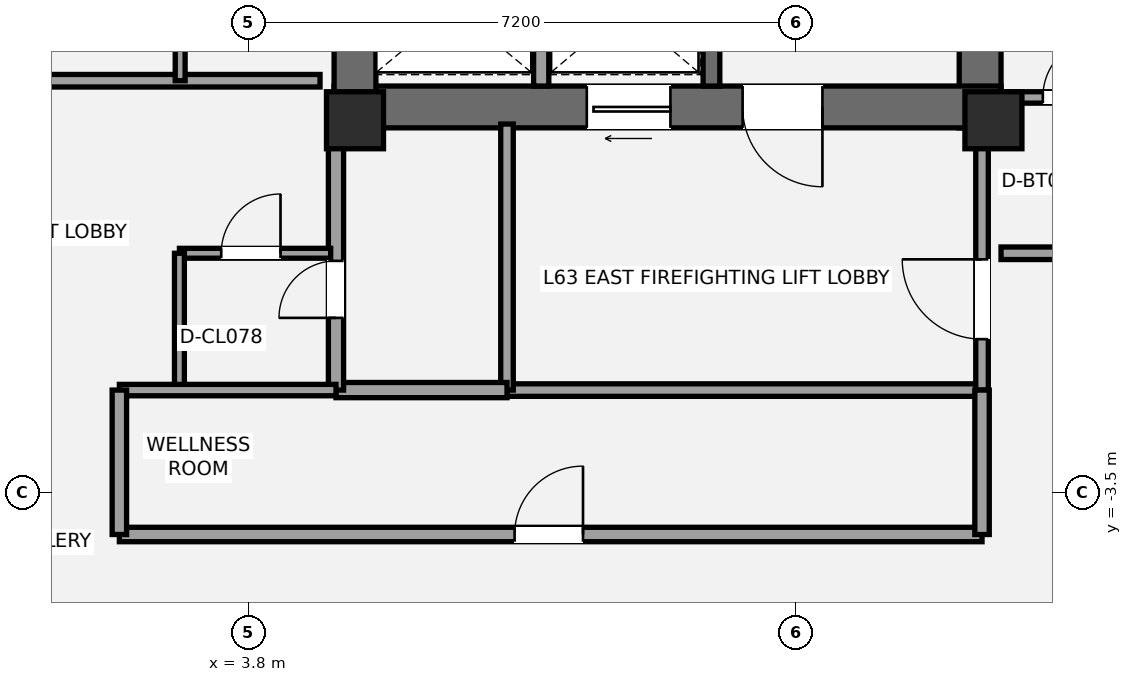
"""IFC4 building model, lengths in metres.
Left out: names, types, materials, properties, quantities, classifications, styles, units other than length and angle.
Written with IfcOpenShell. Run it as: python <this file> out.ifc"""

import sys

from ifc_helpers import new_model, si_unit, direction, frame, frame_2d, origin, origin_2d, place, context, subcontext, project, spatial, rectangle, extrude, element, fill, save


model = new_model("IFC4")
c1 = context("Model", 3, precision=1e-05, world=origin(), true_north=direction((0.0, 1.0)))
c2 = subcontext(c1, "Body", "Model", "MODEL_VIEW")
j1 = project(units=[si_unit("LENGTHUNIT", "METRE"), si_unit("PLANEANGLEUNIT", "RADIAN")], contexts=[c1])
p1 = place(None, origin())
s1 = spatial("IfcSite", under=j1, at=p1, CompositionType="ELEMENT")
p2 = place(p1, origin())
s2 = spatial("IfcBuilding", under=s1, at=p2, CompositionType="ELEMENT")
p3 = place(p2, frame((0.0, 0.0, 225.75)))
s3 = spatial("IfcBuildingStorey", under=s2, at=p3, CompositionType="ELEMENT", Elevation=225.75)
p4 = place(p3, frame((13.425, 1.3, 0.0), z_axis=(0.0, 0.0, 1.0), x_axis=(0.0, 1.0, 0.0)))
e1 = element("IfcWall", 1, at=p4, inside=s3, PredefinedType="SHEAR", context=c2, shape_type="SweptSolid", body=[
    extrude(rectangle(XDim=8.25, YDim=0.55, at=frame_2d((4.125, 0.0))), origin(), (0.0, 0.0, 1.0), 3.15),
])
p5 = place(p3, frame((13.7, 1.575, 0.0), z_axis=(0.0, 0.0, 1.0), x_axis=(-1.0, 0.0, 0.0)))
e2 = element("IfcWall", 2, at=p5, inside=s3, PredefinedType="SHEAR", context=c2, shape_type="SweptSolid", body=[
    extrude(rectangle(XDim=8.775, YDim=0.55, at=frame_2d((4.387, 0.0))), origin(), (0.0, 0.0, 1.0), 3.15),
])
p6 = place(p5, frame((2.35, 0.0, 0.0)))
e3 = element("IfcOpeningElement", 3, at=p6, cuts=e2, PredefinedType="OPENING", context=c2, shape_type="SweptSolid", body=[
    extrude(rectangle(XDim=1.05, YDim=2.15, at=frame_2d((0.525, 1.075))), frame((0.0, 0.285, 0.0), z_axis=(0.0, -1.0, 0.0), x_axis=(1.0, 0.0, 0.0)), (0.0, 0.0, 1.0), 0.57),
])
p7 = place(p5, frame((4.35, 0.0, 0.0)))
e4 = element("IfcOpeningElement", 4, at=p7, cuts=e2, PredefinedType="OPENING", context=c2, shape_type="SweptSolid", body=[
    extrude(rectangle(XDim=1.1, YDim=2.2, at=frame_2d((0.55, 1.1))), frame((0.0, 0.285, 0.0), z_axis=(0.0, -1.0, 0.0), x_axis=(1.0, 0.0, 0.0)), (0.0, 0.0, 1.0), 0.57),
])
p8 = place(p3, frame((5.2, 1.3, 0.0), z_axis=(0.0, 0.0, 1.0), x_axis=(0.0, 1.0, 0.0)))
e5 = element("IfcWall", 5, at=p8, inside=s3, PredefinedType="SHEAR", context=c2, shape_type="SweptSolid", body=[
    extrude(rectangle(XDim=2.5, YDim=0.55, at=frame_2d((1.25, 0.0))), origin(), (0.0, 0.0, 1.0), 3.15),
])
p9 = place(p3, frame((9.89, 1.85, 0.0), z_axis=(0.0, 0.0, 1.0), x_axis=(0.0, 1.0, 0.0)))
e6 = element("IfcWall", 6, at=p9, inside=s3, PredefinedType="SHEAR", context=c2, shape_type="SweptSolid", body=[
    extrude(rectangle(XDim=7.15, YDim=0.22, at=frame_2d((3.575, 0.0))), origin(), (0.0, 0.0, 1.0), 3.15),
])
for number, where, z_axis, x_axis in (
    (7, (5.2, 1.4, 0.0), (0.0, 0.0, 1.0), (1.0, 0.0, 0.0)),
    (8, (13.6, 1.4, 0.0), (0.0, 0.0, 1.0), (1.0, 0.0, 0.0)),
):
    element("IfcColumn", number, at=place(p3, frame(where, z_axis=z_axis, x_axis=x_axis)), inside=s3, PredefinedType="PILASTER", context=c2, shape_type="SweptSolid", body=[
        extrude(rectangle(XDim=0.75, YDim=0.75, at=origin_2d()), origin(), (0.0, 0.0, 1.0), 3.15),
    ])
p10 = place(p3, frame((7.2, -2.15, 0.0), z_axis=(0.0, 0.0, 1.0), x_axis=(1.0, 0.0, 0.0)))
e9 = element("IfcWall", 9, at=p10, inside=s3, PredefinedType="PARTITIONING", context=c2, shape_type="SweptSolid", body=[
    extrude(rectangle(XDim=6.25, YDim=0.165, at=frame_2d((3.125, 0.0))), origin(), (0.0, 0.0, 1.0), 2.97),
])
p11 = place(p3, frame((7.2, -2.15, 0.0), z_axis=(0.0, 0.0, 1.0), x_axis=(0.0, 1.0, 0.0)))
e10 = element("IfcWall", 10, at=p11, inside=s3, PredefinedType="PARTITIONING", context=c2, shape_type="SweptSolid", body=[
    extrude(rectangle(XDim=3.5, YDim=0.165, at=frame_2d((1.75, 0.0))), origin(), (0.0, 0.0, 1.0), 2.423),
])
p12 = place(p3, frame((13.45, -2.15, 0.0), z_axis=(0.0, 0.0, 1.0), x_axis=(0.0, 1.0, 0.0)))
e11 = element("IfcWall", 11, at=p12, inside=s3, PredefinedType="PARTITIONING", context=c2, shape_type="SweptSolid", body=[
    extrude(rectangle(XDim=3.5, YDim=0.165, at=frame_2d((1.75, 0.0))), origin(), (0.0, 0.0, 1.0), 2.423),
])
p13 = place(p12, frame((0.67, 0.0, 0.0)))
e12 = element("IfcOpeningElement", 12, at=p13, cuts=e11, PredefinedType="OPENING", context=c2, shape_type="SweptSolid", body=[
    extrude(rectangle(XDim=1.05, YDim=2.15, at=frame_2d((0.525, 1.075))), frame((0.0, 0.093, 0.0), z_axis=(0.0, -1.0, 0.0), x_axis=(1.0, 0.0, 0.0)), (0.0, 0.0, 1.0), 0.185),
])
p14 = place(p3, frame((4.95, -2.15, 0.0), z_axis=(0.0, 0.0, 1.0), x_axis=(1.0, 0.0, 0.0)))
e13 = element("IfcWall", 13, at=p14, inside=s3, PredefinedType="SOLIDWALL", context=c2, shape_type="SweptSolid", body=[
    extrude(rectangle(XDim=2.25, YDim=0.2, at=frame_2d((1.125, 0.0))), origin(), (0.0, 0.0, 1.0), 2.97),
])
p15 = place(p3, frame((4.95, -2.15, 0.0), z_axis=(0.0, 0.0, 1.0), x_axis=(0.0, 1.0, 0.0)))
e14 = element("IfcWall", 14, at=p15, inside=s3, PredefinedType="SOLIDWALL", context=c2, shape_type="SweptSolid", body=[
    extrude(rectangle(XDim=3.5, YDim=0.2, at=frame_2d((1.75, 0.0))), origin(), (0.0, 0.0, 1.0), 2.423),
])
p16 = place(p15, frame((0.95, 0.0, 0.0)))
e15 = element("IfcOpeningElement", 15, at=p16, cuts=e14, PredefinedType="OPENING", context=c2, shape_type="SweptSolid", body=[
    extrude(rectangle(XDim=0.75, YDim=2.1, at=frame_2d((0.375, 1.05))), frame((0.0, 0.11, 0.0), z_axis=(0.0, -1.0, 0.0), x_axis=(1.0, 0.0, 0.0)), (0.0, 0.0, 1.0), 0.22),
])
p17 = place(p3, frame((2.89, -0.35, 0.0), z_axis=(0.0, 0.0, 1.0), x_axis=(1.0, 0.0, 0.0)))
e16 = element("IfcWall", 16, at=p17, inside=s3, PredefinedType="PARTITIONING", context=c2, shape_type="SweptSolid", body=[
    extrude(rectangle(XDim=1.99, YDim=0.13, at=frame_2d((0.995, 0.0))), origin(), (0.0, 0.0, 1.0), 2.423),
])
p18 = place(p17, frame((0.55, 0.0, 0.0)))
e17 = element("IfcOpeningElement", 17, at=p18, cuts=e16, PredefinedType="OPENING", context=c2, shape_type="SweptSolid", body=[
    extrude(rectangle(XDim=0.78, YDim=2.1, at=frame_2d((0.39, 1.05))), frame((0.0, 0.075, 0.0), z_axis=(0.0, -1.0, 0.0), x_axis=(1.0, 0.0, 0.0)), (0.0, 0.0, 1.0), 0.15),
])
p19 = place(p3, frame((2.89, -2.15, 0.0), z_axis=(0.0, 0.0, 1.0), x_axis=(0.0, 1.0, 0.0)))
e18 = element("IfcWall", 18, at=p19, inside=s3, PredefinedType="PARTITIONING", context=c2, shape_type="SweptSolid", body=[
    extrude(rectangle(XDim=1.8, YDim=0.13, at=frame_2d((0.9, 0.0))), origin(), (0.0, 0.0, 1.0), 2.97),
])
p20 = place(p3, frame((7.65, 1.85, 0.0), z_axis=(0.0, 0.0, 1.0), x_axis=(0.0, 1.0, 0.0)))
e19 = element("IfcWall", 19, at=p20, inside=s3, PredefinedType="SOLIDWALL", context=c2, shape_type="SweptSolid", body=[
    extrude(rectangle(XDim=1.97, YDim=0.2, at=frame_2d((0.985, 0.0))), origin(), (0.0, 0.0, 1.0), 2.97),
])
p21 = place(p3, frame((0.85, 1.92, 0.0), z_axis=(0.0, 0.0, 1.0), x_axis=(1.0, 0.0, 0.0)))
e20 = element("IfcWall", 20, at=p21, inside=s3, PredefinedType="PARTITIONING", context=c2, shape_type="SweptSolid", body=[
    extrude(rectangle(XDim=3.89, YDim=0.165, at=frame_2d((1.945, 0.0))), origin(), (0.0, 0.0, 1.0), 2.11),
])
p22 = place(p3, frame((2.9, 1.92, 0.0), z_axis=(0.0, 0.0, 1.0), x_axis=(0.0, 1.0, 0.0)))
e21 = element("IfcWall", 21, at=p22, inside=s3, PredefinedType="PARTITIONING", context=c2, shape_type="SweptSolid", body=[
    extrude(rectangle(XDim=1.82, YDim=0.13, at=frame_2d((0.91, 0.0))), origin(), (0.0, 0.0, 1.0), 2.97),
])
p23 = place(p3, frame((2.1, -4.05, 0.0), z_axis=(0.0, 0.0, 1.0), x_axis=(1.0, 0.0, 0.0)))
e22 = element("IfcWall", 22, at=p23, inside=s3, PredefinedType="PLUMBINGWALL", context=c2, shape_type="SweptSolid", body=[
    extrude(rectangle(XDim=11.35, YDim=0.19, at=frame_2d((5.675, 0.0))), origin(), (0.0, 0.0, 1.0), 2.357),
])
p24 = place(p23, frame((5.2, 0.0, 0.0)))
e23 = element("IfcOpeningElement", 23, at=p24, cuts=e22, PredefinedType="OPENING", context=c2, shape_type="SweptSolid", body=[
    extrude(rectangle(XDim=0.9, YDim=2.1, at=frame_2d((0.45, 1.05))), frame((0.0, 0.105, 0.0), z_axis=(0.0, -1.0, 0.0), x_axis=(1.0, 0.0, 0.0)), (0.0, 0.0, 1.0), 0.21),
])
p25 = place(p3, frame((2.1, -2.15, 0.0), z_axis=(0.0, 0.0, 1.0), x_axis=(1.0, 0.0, 0.0)))
e24 = element("IfcWall", 24, at=p25, inside=s3, PredefinedType="PLUMBINGWALL", context=c2, shape_type="SweptSolid", body=[
    extrude(rectangle(XDim=2.85, YDim=0.15, at=frame_2d((1.425, 0.0))), origin(), (0.0, 0.0, 1.0), 2.97),
])
p26 = place(p3, frame((2.1, -4.05, 0.0), z_axis=(0.0, 0.0, 1.0), x_axis=(0.0, 1.0, 0.0)))
e25 = element("IfcWall", 25, at=p26, inside=s3, PredefinedType="PLUMBINGWALL", context=c2, shape_type="SweptSolid", body=[
    extrude(rectangle(XDim=1.9, YDim=0.19, at=frame_2d((0.95, 0.0))), origin(), (0.0, 0.0, 1.0), 2.97),
])
p27 = place(p3, frame((13.45, -4.05, 0.0), z_axis=(0.0, 0.0, 1.0), x_axis=(0.0, 1.0, 0.0)))
e26 = element("IfcWall", 26, at=p27, inside=s3, PredefinedType="PLUMBINGWALL", context=c2, shape_type="SweptSolid", body=[
    extrude(rectangle(XDim=1.9, YDim=0.19, at=frame_2d((0.95, 0.0))), origin(), (0.0, 0.0, 1.0), 2.423),
])
p28 = place(p3, frame((13.7, -0.35, 0.0), z_axis=(0.0, 0.0, 1.0), x_axis=(1.0, 0.0, 0.0)))
e27 = element("IfcWall", 27, at=p28, inside=s3, PredefinedType="PARTITIONING", context=c2, shape_type="SweptSolid", body=[
    extrude(rectangle(XDim=1.85, YDim=0.165, at=frame_2d((0.925, 0.0))), origin(), (0.0, 0.0, 1.0), 2.423),
])
p29 = place(p3, frame((13.7, 1.7, 0.0), z_axis=(0.0, 0.0, 1.0), x_axis=(1.0, 0.0, 0.0)))
e28 = element("IfcWall", 28, at=p29, inside=s3, PredefinedType="PLUMBINGWALL", context=c2, shape_type="SweptSolid", body=[
    extrude(rectangle(XDim=4.25, YDim=0.15, at=frame_2d((2.125, 0.0))), origin(), (0.0, 0.0, 1.0), 2.423),
])
p30 = place(p29, frame((0.55, 0.0, 0.0)))
e29 = element("IfcOpeningElement", 29, at=p30, cuts=e28, PredefinedType="OPENING", context=c2, shape_type="SweptSolid", body=[
    extrude(rectangle(XDim=0.8, YDim=2.1, at=frame_2d((0.4, 1.05))), frame((0.0, 0.085, 0.0), z_axis=(0.0, -1.0, 0.0), x_axis=(1.0, 0.0, 0.0)), (0.0, 0.0, 1.0), 0.17),
])
p31 = place(p29, frame((2.15, 0.0, 0.0)))
e30 = element("IfcOpeningElement", 30, at=p31, cuts=e28, PredefinedType="OPENING", context=c2, shape_type="SweptSolid", body=[
    extrude(rectangle(XDim=0.85, YDim=2.1, at=frame_2d((0.425, 1.05))), frame((0.0, 0.085, 0.0), z_axis=(0.0, -1.0, 0.0), x_axis=(1.0, 0.0, 0.0)), (0.0, 0.0, 1.0), 0.17),
])
p32 = place(p6, origin())
e31 = element("IfcDoor", 31, at=p32, inside=s3, OperationType="SINGLE_SWING_LEFT", PredefinedType="DOOR", context=c2, shape_type="SweptSolid", body=[
    extrude(rectangle(XDim=1.05, YDim=2.15, at=frame_2d((0.525, 1.075))), frame((0.0, 0.025, 0.0), z_axis=(0.0, -1.0, 0.0), x_axis=(1.0, 0.0, 0.0)), (0.0, 0.0, 1.0), 0.05),
])
fill(e3, e31)
p33 = place(p13, origin())
e32 = element("IfcDoor", 32, at=p33, inside=s3, OperationType="SINGLE_SWING_RIGHT", PredefinedType="DOOR", context=c2, shape_type="SweptSolid", body=[
    extrude(rectangle(XDim=1.05, YDim=2.15, at=frame_2d((0.525, 1.075))), frame((0.0, 0.025, 0.0), z_axis=(0.0, -1.0, 0.0), x_axis=(1.0, 0.0, 0.0)), (0.0, 0.0, 1.0), 0.05),
])
fill(e12, e32)
p34 = place(p16, origin())
e33 = element("IfcDoor", 33, at=p34, inside=s3, OperationType="SINGLE_SWING_LEFT", PredefinedType="DOOR", context=c2, shape_type="SweptSolid", body=[
    extrude(rectangle(XDim=0.75, YDim=2.1, at=frame_2d((0.375, 1.05))), frame((0.0, 0.025, 0.0), z_axis=(0.0, -1.0, 0.0), x_axis=(1.0, 0.0, 0.0)), (0.0, 0.0, 1.0), 0.05),
])
fill(e15, e33)
p35 = place(p18, origin())
e34 = element("IfcDoor", 34, at=p35, inside=s3, OperationType="SINGLE_SWING_RIGHT", PredefinedType="DOOR", context=c2, shape_type="SweptSolid", body=[
    extrude(rectangle(XDim=0.78, YDim=2.1, at=frame_2d((0.39, 1.05))), frame((0.0, 0.025, 0.0), z_axis=(0.0, -1.0, 0.0), x_axis=(1.0, 0.0, 0.0)), (0.0, 0.0, 1.0), 0.05),
])
fill(e17, e34)
p36 = place(p7, origin())
e35 = element("IfcDoor", 35, at=p36, inside=s3, OperationType="SLIDING_TO_LEFT", PredefinedType="DOOR", context=c2, shape_type="SweptSolid", body=[
    extrude(rectangle(XDim=1.1, YDim=2.2, at=frame_2d((0.55, 1.1))), frame((0.0, 0.025, 0.0), z_axis=(0.0, -1.0, 0.0), x_axis=(1.0, 0.0, 0.0)), (0.0, 0.0, 1.0), 0.05),
])
fill(e4, e35)
p37 = place(p24, origin())
e36 = element("IfcDoor", 36, at=p37, inside=s3, OperationType="SINGLE_SWING_RIGHT", PredefinedType="DOOR", context=c2, shape_type="SweptSolid", body=[
    extrude(rectangle(XDim=0.9, YDim=2.1, at=frame_2d((0.45, 1.05))), frame((0.0, 0.025, 0.0), z_axis=(0.0, -1.0, 0.0), x_axis=(1.0, 0.0, 0.0)), (0.0, 0.0, 1.0), 0.05),
])
fill(e23, e36)
p38 = place(p30, origin())
e37 = element("IfcDoor", 37, at=p38, inside=s3, OperationType="SINGLE_SWING_RIGHT", PredefinedType="DOOR", context=c2, shape_type="SweptSolid", body=[
    extrude(rectangle(XDim=0.8, YDim=2.1, at=frame_2d((0.4, 1.05))), frame((0.0, 0.025, 0.0), z_axis=(0.0, -1.0, 0.0), x_axis=(1.0, 0.0, 0.0)), (0.0, 0.0, 1.0), 0.05),
])
fill(e29, e37)
save(model, sys.argv[1])
